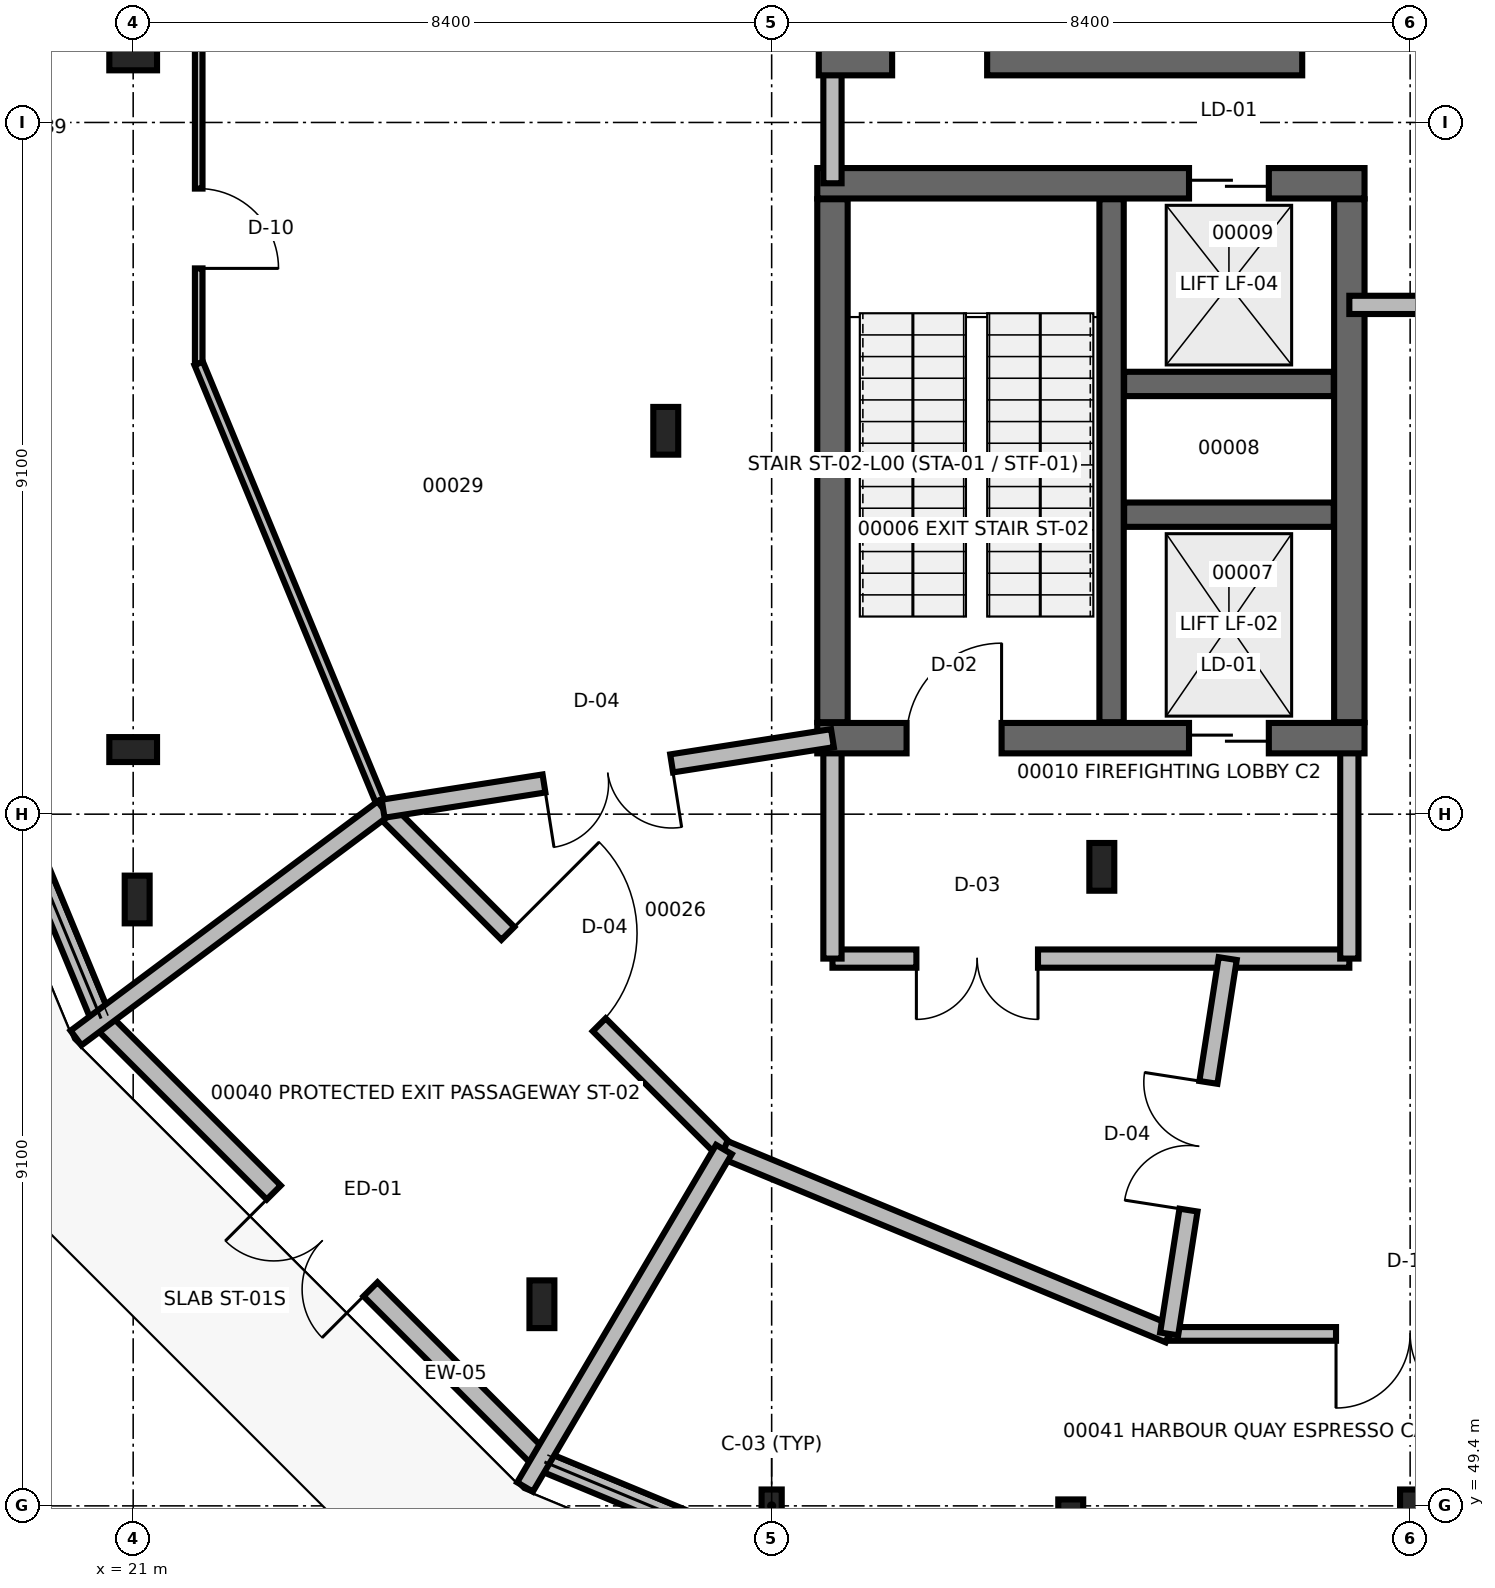
"""IFC4 building model, lengths in metres.
Left out: names, types, materials, properties, quantities, classifications, styles, units other than length and angle.
Written with IfcOpenShell. Run it as: python <this file> out.ifc"""

import sys

from ifc_helpers import new_model, si_unit, direction, frame, frame_2d, origin, origin_2d, place, context, subcontext, project, spatial, rectangle, i_section, extrude, element, fill, save


model = new_model("IFC4")
c1 = context("Model", 3, precision=1e-05, world=origin(), true_north=direction((0.0, 1.0)))
c2 = subcontext(c1, "Body", "Model", "MODEL_VIEW")
j1 = project(units=[si_unit("LENGTHUNIT", "METRE"), si_unit("PLANEANGLEUNIT", "RADIAN")], contexts=[c1])
p1 = place(None, origin())
s1 = spatial("IfcSite", under=j1, at=p1, CompositionType="ELEMENT")
p2 = place(p1, origin())
s2 = spatial("IfcBuilding", under=s1, at=p2, CompositionType="ELEMENT")
p3 = place(p2, origin())
s3 = spatial("IfcBuildingStorey", under=s2, at=p3, CompositionType="ELEMENT", Elevation=0.0)
for number, where, z_axis, x_axis in (
    (1, (28.007, 63.544, 0.0), (0.0, 0.0, 1.0), (1.0, 0.0, 0.0)),
    (2, (33.744, 57.807, 0.0), (0.0, 0.0, 1.0), (1.0, 0.0, 0.0)),
    (3, (21.052, 57.377, 0.0), (0.0, 0.0, 1.0), (1.0, 0.0, 0.0)),
    (4, (26.377, 52.052, 0.0), (0.0, 0.0, 1.0), (1.0, 0.0, 0.0)),
    (5, (33.335, 49.171, 0.0), (0.0, 0.0, 1.0), (1.0, 0.0, 0.0)),
    (6, (21.0, 59.35, 0.0), (0.0, 0.0, 1.0), (0.0, 1.0, 0.0)),
    (7, (21.0, 68.45, 0.0), (0.0, 0.0, 1.0), (0.0, 1.0, 0.0)),
):
    element("IfcColumn", number, at=place(p3, frame(where, z_axis=z_axis, x_axis=x_axis)), inside=s3, PredefinedType="COLUMN", context=c2, shape_type="SweptSolid", body=[
        extrude(i_section(OverallWidth=0.328, OverallDepth=0.628, WebThickness=0.017, FlangeThickness=0.028, at=origin_2d()), origin(), (0.0, 0.0, 1.0), 5.1),
    ])
for number, where, z_axis, x_axis in (
    (8, (29.4, 49.4, 0.0), (0.0, 0.0, 1.0), (1.0, 0.0, 0.0)),
    (9, (37.8, 49.4, 0.0), (0.0, 0.0, 1.0), (1.0, 0.0, 0.0)),
):
    element("IfcColumn", number, at=place(p3, frame(where, z_axis=z_axis, x_axis=x_axis)), inside=s3, PredefinedType="COLUMN", context=c2, shape_type="SweptSolid", body=[
        extrude(i_section(OverallWidth=0.265, OverallDepth=0.431, WebThickness=0.015, FlangeThickness=0.025, at=origin_2d()), origin(), (0.0, 0.0, 1.0), 5.1),
    ])
p4 = place(p3, frame((17.465, 63.325, 0.0), z_axis=(0.0, 0.0, 1.0), x_axis=(0.382670790122, -0.923884768998, 0.0)))
e10 = element("IfcWall", 10, at=p4, inside=s3, PredefinedType="SOLIDWALL", context=c2, shape_type="SweptSolid", body=[
    extrude(rectangle(XDim=8.134, YDim=0.26, at=frame_2d((4.067, 0.0))), origin(), (0.0, 0.0, 1.0), 1.48),
])
p5 = place(p3, frame((20.61, 55.762, 0.0), z_axis=(0.0, 0.0, 1.0), x_axis=(0.707106781187, -0.707106781187, 0.0)))
e11 = element("IfcWall", 11, at=p5, inside=s3, PredefinedType="SOLIDWALL", context=c2, shape_type="SweptSolid", body=[
    extrude(rectangle(XDim=8.134, YDim=0.26, at=frame_2d((4.067, 0.0))), origin(), (0.0, 0.0, 1.0), 3.845),
])
p6 = place(p5, frame((3.167, 0.0, 0.0)))
e12 = element("IfcOpeningElement", 12, at=p6, cuts=e11, PredefinedType="OPENING", context=c2, shape_type="SweptSolid", body=[
    extrude(rectangle(XDim=1.8, YDim=2.4, at=frame_2d((0.9, 1.2))), frame((0.0, 0.14, 0.0), z_axis=(0.0, -1.0, 0.0), x_axis=(1.0, 0.0, 0.0)), (0.0, 0.0, 1.0), 0.28),
])
p7 = place(p3, frame((26.411, 49.978, 0.0), z_axis=(0.0, 0.0, 1.0), x_axis=(0.923884768998, -0.382670790122, 0.0)))
e13 = element("IfcWall", 13, at=p7, inside=s3, PredefinedType="SOLIDWALL", context=c2, shape_type="SweptSolid", body=[
    extrude(rectangle(XDim=8.134, YDim=0.26, at=frame_2d((4.067, 0.0))), origin(), (0.0, 0.0, 1.0), 1.48),
])
p8 = place(p3, frame((30.2, 56.6, 0.0), z_axis=(0.0, 0.0, 1.0), x_axis=(1.0, 0.0, 0.0)))
e14 = element("IfcWall", 14, at=p8, inside=s3, PredefinedType="SOLIDWALL", context=c2, shape_type="SweptSolid", body=[
    extrude(rectangle(XDim=6.8, YDim=0.24, at=frame_2d((3.4, 0.0))), origin(), (0.0, 0.0, 1.0), 4.179),
])
p9 = place(p8, frame((1.104, 0.0, 0.0)))
e15 = element("IfcOpeningElement", 15, at=p9, cuts=e14, PredefinedType="OPENING", context=c2, shape_type="SweptSolid", body=[
    extrude(rectangle(XDim=1.6, YDim=2.2, at=frame_2d((0.8, 1.1))), frame((0.0, 0.13, 0.0), z_axis=(0.0, -1.0, 0.0), x_axis=(1.0, 0.0, 0.0)), (0.0, 0.0, 1.0), 0.26),
])
p10 = place(p3, frame((30.2, 59.5, 0.0), z_axis=(0.0, 0.0, 1.0), x_axis=(0.0, -1.0, 0.0)))
e16 = element("IfcWall", 16, at=p10, inside=s3, PredefinedType="SOLIDWALL", context=c2, shape_type="SweptSolid", body=[
    extrude(rectangle(XDim=2.9, YDim=0.24, at=frame_2d((1.45, 0.0))), origin(), (0.0, 0.0, 1.0), 4.72),
])
p11 = place(p3, frame((37.0, 56.6, 0.0), z_axis=(0.0, 0.0, 1.0), x_axis=(0.0, 1.0, 0.0)))
e17 = element("IfcWall", 17, at=p11, inside=s3, PredefinedType="SOLIDWALL", context=c2, shape_type="SweptSolid", body=[
    extrude(rectangle(XDim=2.9, YDim=0.24, at=frame_2d((1.45, 0.0))), origin(), (0.0, 0.0, 1.0), 4.179),
])
p12 = place(p3, frame((30.0, 59.5, 0.0), z_axis=(0.0, 0.0, 1.0), x_axis=(1.0, 0.0, 0.0)))
e18 = element("IfcWall", 18, at=p12, inside=s3, PredefinedType="SHEAR", context=c2, shape_type="SweptSolid", body=[
    extrude(rectangle(XDim=7.2, YDim=0.4, at=frame_2d((3.6, 0.0))), origin(), (0.0, 0.0, 1.0), 4.82),
])
p13 = place(p12, frame((1.175, 0.0, 0.0)))
e19 = element("IfcOpeningElement", 19, at=p13, cuts=e18, PredefinedType="OPENING", context=c2, shape_type="SweptSolid", body=[
    extrude(rectangle(XDim=1.25, YDim=2.2, at=frame_2d((0.625, 1.1))), frame((0.0, 0.21, 0.0), z_axis=(0.0, -1.0, 0.0), x_axis=(1.0, 0.0, 0.0)), (0.0, 0.0, 1.0), 0.42),
])
p14 = place(p12, frame((4.891, 0.0, 0.0)))
e20 = element("IfcOpeningElement", 20, at=p14, cuts=e18, PredefinedType="OPENING", context=c2, shape_type="SweptSolid", body=[
    extrude(rectangle(XDim=1.05, YDim=2.15, at=frame_2d((0.525, 1.075))), frame((0.0, 0.21, 0.0), z_axis=(0.0, -1.0, 0.0), x_axis=(1.0, 0.0, 0.0)), (0.0, 0.0, 1.0), 0.42),
])
p15 = place(p3, frame((30.0, 66.8, 0.0), z_axis=(0.0, 0.0, 1.0), x_axis=(1.0, 0.0, 0.0)))
e21 = element("IfcWall", 21, at=p15, inside=s3, PredefinedType="SHEAR", context=c2, shape_type="SweptSolid", body=[
    extrude(rectangle(XDim=7.2, YDim=0.4, at=frame_2d((3.6, 0.0))), origin(), (0.0, 0.0, 1.0), 4.82),
])
p16 = place(p15, frame((4.891, 0.0, 0.0)))
e22 = element("IfcOpeningElement", 22, at=p16, cuts=e21, PredefinedType="OPENING", context=c2, shape_type="SweptSolid", body=[
    extrude(rectangle(XDim=1.05, YDim=2.15, at=frame_2d((0.525, 1.075))), frame((0.0, 0.21, 0.0), z_axis=(0.0, -1.0, 0.0), x_axis=(1.0, 0.0, 0.0)), (0.0, 0.0, 1.0), 0.42),
])
for number, where, z_axis, x_axis in (
    (23, (30.2, 59.71, 0.0), (0.0, 0.0, 1.0), (0.0, 1.0, 0.0)),
    (24, (37.0, 59.71, 0.0), (0.0, 0.0, 1.0), (0.0, 1.0, 0.0)),
):
    element("IfcWall", number, at=place(p3, frame(where, z_axis=z_axis, x_axis=x_axis)), inside=s3, PredefinedType="SHEAR", context=c2, shape_type="SweptSolid", body=[
        extrude(rectangle(XDim=6.88, YDim=0.4, at=frame_2d((3.44, 0.0))), origin(), (0.0, 0.0, 1.0), 4.82),
    ])
p17 = place(p3, frame((33.872, 59.71, 0.0), z_axis=(0.0, 0.0, 1.0), x_axis=(0.0, 1.0, 0.0)))
e25 = element("IfcWall", 25, at=p17, inside=s3, PredefinedType="SHEAR", context=c2, shape_type="SweptSolid", body=[
    extrude(rectangle(XDim=6.88, YDim=0.32, at=frame_2d((3.44, 0.0))), origin(), (0.0, 0.0, 1.0), 4.82),
])
for number, where, z_axis, x_axis in (
    (26, (34.037, 62.44, 0.0), (0.0, 0.0, 1.0), (1.0, 0.0, 0.0)),
    (27, (34.037, 64.16, 0.0), (0.0, 0.0, 1.0), (1.0, 0.0, 0.0)),
):
    element("IfcWall", number, at=place(p3, frame(where, z_axis=z_axis, x_axis=x_axis)), inside=s3, PredefinedType="SHEAR", context=c2, shape_type="SweptSolid", body=[
        extrude(rectangle(XDim=2.758, YDim=0.32, at=frame_2d((1.379, 0.0))), origin(), (0.0, 0.0, 1.0), 4.82),
    ])
p18 = place(p3, frame((30.2, 66.8, 0.0), z_axis=(0.0, 0.0, 1.0), x_axis=(0.0, 1.0, 0.0)))
e28 = element("IfcWall", 28, at=p18, inside=s3, PredefinedType="SOLIDWALL", context=c2, shape_type="SweptSolid", body=[
    extrude(rectangle(XDim=1.6, YDim=0.24, at=frame_2d((0.8, 0.0))), origin(), (0.0, 0.0, 1.0), 4.72),
])
p19 = place(p3, frame((37.0, 65.2, 0.0), z_axis=(0.0, 0.0, 1.0), x_axis=(1.0, 0.0, 0.0)))
e29 = element("IfcWall", 29, at=p19, inside=s3, PredefinedType="SOLIDWALL", context=c2, shape_type="SweptSolid", body=[
    extrude(rectangle(XDim=1.6, YDim=0.24, at=frame_2d((0.8, 0.0))), origin(), (0.0, 0.0, 1.0), 4.72),
])
p20 = place(p3, frame((30.02, 68.4, 0.0), z_axis=(0.0, 0.0, 1.0), x_axis=(1.0, 0.0, 0.0)))
e30 = element("IfcWall", 30, at=p20, inside=s3, PredefinedType="SHEAR", context=c2, shape_type="SweptSolid", body=[
    extrude(rectangle(XDim=6.36, YDim=0.36, at=frame_2d((3.18, 0.0))), origin(), (0.0, 0.0, 1.0), 4.82),
])
p21 = place(p20, frame((0.965, 0.0, 0.0)))
e31 = element("IfcOpeningElement", 31, at=p21, cuts=e30, PredefinedType="OPENING", context=c2, shape_type="SweptSolid", body=[
    extrude(rectangle(XDim=1.25, YDim=2.2, at=frame_2d((0.625, 1.1))), frame((0.0, 0.19, 0.0), z_axis=(0.0, -1.0, 0.0), x_axis=(1.0, 0.0, 0.0)), (0.0, 0.0, 1.0), 0.38),
])
p22 = place(p3, frame((21.862, 70.77, 0.0), z_axis=(0.0, 0.0, 1.0), x_axis=(0.0, -1.0, 0.0)))
e32 = element("IfcWall", 32, at=p22, inside=s3, PredefinedType="PARTITIONING", context=c2, shape_type="SweptSolid", body=[
    extrude(rectangle(XDim=6.341, YDim=0.1, at=frame_2d((3.17, 0.0))), origin(), (0.0, 0.0, 1.0), 4.179),
])
p23 = place(p22, frame((4.04, 0.0, 0.0)))
e33 = element("IfcOpeningElement", 33, at=p23, cuts=e32, PredefinedType="OPENING", context=c2, shape_type="SweptSolid", body=[
    extrude(rectangle(XDim=1.05, YDim=2.15, at=frame_2d((0.525, 1.075))), frame((0.0, 0.06, 0.0), z_axis=(0.0, -1.0, 0.0), x_axis=(1.0, 0.0, 0.0)), (0.0, 0.0, 1.0), 0.12),
])
p24 = place(p3, frame((21.862, 64.43, 0.0), z_axis=(0.0, 0.0, 1.0), x_axis=(0.382676004295, -0.923882609284, 0.0)))
e34 = element("IfcWall", 34, at=p24, inside=s3, PredefinedType="PARTITIONING", context=c2, shape_type="SweptSolid", body=[
    extrude(rectangle(XDim=6.34, YDim=0.12, at=frame_2d((3.17, 0.0))), origin(), (0.0, 0.0, 1.0), 4.179),
])
p25 = place(p3, frame((24.289, 58.572, 0.0), z_axis=(0.0, 0.0, 1.0), x_axis=(0.707106781187, -0.707106781187, 0.0)))
e35 = element("IfcWall", 35, at=p25, inside=s3, PredefinedType="SOLIDWALL", context=c2, shape_type="SweptSolid", body=[
    extrude(rectangle(XDim=6.341, YDim=0.24, at=frame_2d((3.17, 0.0))), origin(), (0.0, 0.0, 1.0), 4.179),
])
p26 = place(p25, frame((2.32, 0.0, 0.0)))
e36 = element("IfcOpeningElement", 36, at=p26, cuts=e35, PredefinedType="OPENING", context=c2, shape_type="SweptSolid", body=[
    extrude(rectangle(XDim=1.7, YDim=2.25, at=frame_2d((0.85, 1.125))), frame((0.0, 0.13, 0.0), z_axis=(0.0, -1.0, 0.0), x_axis=(1.0, 0.0, 0.0)), (0.0, 0.0, 1.0), 0.26),
])
p27 = place(p3, frame((28.772, 54.089, 0.0), z_axis=(0.0, 0.0, 1.0), x_axis=(0.92387463456, -0.382695256851, 0.0)))
e37 = element("IfcWall", 37, at=p27, inside=s3, PredefinedType="SOLIDWALL", context=c2, shape_type="SweptSolid", body=[
    extrude(rectangle(XDim=6.341, YDim=0.24, at=frame_2d((3.17, 0.0))), origin(), (0.0, 0.0, 1.0), 4.179),
])
p28 = place(p3, frame((34.63, 51.662, 0.0), z_axis=(0.0, 0.0, 1.0), x_axis=(1.0, 0.0, 0.0)))
e38 = element("IfcWall", 38, at=p28, inside=s3, PredefinedType="PARTITIONING", context=c2, shape_type="SweptSolid", body=[
    extrude(rectangle(XDim=6.34, YDim=0.18, at=frame_2d((3.17, 0.0))), origin(), (0.0, 0.0, 1.0), 4.179),
])
p29 = place(p28, frame((2.195, 0.0, 0.0)))
e39 = element("IfcOpeningElement", 39, at=p29, cuts=e38, PredefinedType="OPENING", context=c2, shape_type="SweptSolid", body=[
    extrude(rectangle(XDim=1.95, YDim=2.35, at=frame_2d((0.975, 1.175))), frame((0.0, 0.1, 0.0), z_axis=(0.0, -1.0, 0.0), x_axis=(1.0, 0.0, 0.0)), (0.0, 0.0, 1.0), 0.2),
])
p30 = place(p3, frame((24.289, 58.572, 0.0), z_axis=(0.0, 0.0, 1.0), x_axis=(-0.801270627891, -0.598302081627, 0.0)))
e40 = element("IfcWall", 40, at=p30, inside=s3, PredefinedType="SOLIDWALL", context=c2, shape_type="SweptSolid", body=[
    extrude(rectangle(XDim=5.042, YDim=0.24, at=frame_2d((2.521, 0.0))), origin(), (0.0, 0.0, 1.0), 4.179),
])
p31 = place(p3, frame((28.772, 54.089, 0.0), z_axis=(0.0, 0.0, 1.0), x_axis=(-0.507694819058, -0.861536981622, 0.0)))
e41 = element("IfcWall", 41, at=p31, inside=s3, PredefinedType="SOLIDWALL", context=c2, shape_type="SweptSolid", body=[
    extrude(rectangle(XDim=5.154, YDim=0.24, at=frame_2d((2.577, 0.0))), origin(), (0.0, 0.0, 1.0), 4.179),
])
p32 = place(p3, frame((24.289, 58.572, 0.0), z_axis=(0.0, 0.0, 1.0), x_axis=(0.987901515466, 0.155082544926, 0.0)))
e42 = element("IfcWall", 42, at=p32, inside=s3, PredefinedType="SOLIDWALL", context=c2, shape_type="SweptSolid", body=[
    extrude(rectangle(XDim=5.984, YDim=0.24, at=frame_2d((2.992, 0.0))), origin(), (0.0, 0.0, 1.0), 4.179),
])
p33 = place(p32, frame((2.142, 0.0, 0.0)))
e43 = element("IfcOpeningElement", 43, at=p33, cuts=e42, PredefinedType="OPENING", context=c2, shape_type="SweptSolid", body=[
    extrude(rectangle(XDim=1.7, YDim=2.25, at=frame_2d((0.85, 1.125))), frame((0.0, 0.13, 0.0), z_axis=(0.0, -1.0, 0.0), x_axis=(1.0, 0.0, 0.0)), (0.0, 0.0, 1.0), 0.26),
])
p34 = place(p3, frame((34.63, 51.662, 0.0), z_axis=(0.0, 0.0, 1.0), x_axis=(0.154075850756, 0.988059022637, 0.0)))
e44 = element("IfcWall", 44, at=p34, inside=s3, PredefinedType="SOLIDWALL", context=c2, shape_type="SweptSolid", body=[
    extrude(rectangle(XDim=4.998, YDim=0.24, at=frame_2d((2.499, 0.0))), origin(), (0.0, 0.0, 1.0), 4.179),
])
p35 = place(p34, frame((1.649, 0.0, 0.0)))
e45 = element("IfcOpeningElement", 45, at=p35, cuts=e44, PredefinedType="OPENING", context=c2, shape_type="SweptSolid", body=[
    extrude(rectangle(XDim=1.7, YDim=2.25, at=frame_2d((0.85, 1.125))), frame((0.0, 0.13, 0.0), z_axis=(0.0, -1.0, 0.0), x_axis=(1.0, 0.0, 0.0)), (0.0, 0.0, 1.0), 0.26),
])
p36 = place(p6, frame((1.8, 0.0, 0.0), z_axis=(0.0, 0.0, 1.0), x_axis=(-1.0, 0.0, 0.0)))
e46 = element("IfcDoor", 46, at=p36, inside=s3, OperationType="DOUBLE_DOOR_SINGLE_SWING", PredefinedType="DOOR", context=c2, shape_type="SweptSolid", body=[
    extrude(rectangle(XDim=1.8, YDim=2.4, at=frame_2d((0.9, 1.2))), frame((0.0, 0.025, 0.0), z_axis=(0.0, -1.0, 0.0), x_axis=(1.0, 0.0, 0.0)), (0.0, 0.0, 1.0), 0.05),
])
fill(e12, e46)
p37 = place(p9, frame((1.6, 0.0, 0.0), z_axis=(0.0, 0.0, 1.0), x_axis=(-1.0, 0.0, 0.0)))
e47 = element("IfcDoor", 47, at=p37, inside=s3, OperationType="DOUBLE_DOOR_SINGLE_SWING", PredefinedType="DOOR", context=c2, shape_type="SweptSolid", body=[
    extrude(rectangle(XDim=1.6, YDim=2.2, at=frame_2d((0.8, 1.1))), frame((0.0, 0.025, 0.0), z_axis=(0.0, -1.0, 0.0), x_axis=(1.0, 0.0, 0.0)), (0.0, 0.0, 1.0), 0.05),
])
fill(e15, e47)
p38 = place(p13, frame((1.25, 0.0, 0.0), z_axis=(0.0, 0.0, 1.0), x_axis=(-1.0, 0.0, 0.0)))
e48 = element("IfcDoor", 48, at=p38, inside=s3, OperationType="SINGLE_SWING_LEFT", PredefinedType="DOOR", context=c2, shape_type="SweptSolid", body=[
    extrude(rectangle(XDim=1.25, YDim=2.2, at=frame_2d((0.625, 1.1))), frame((0.0, 0.025, 0.0), z_axis=(0.0, -1.0, 0.0), x_axis=(1.0, 0.0, 0.0)), (0.0, 0.0, 1.0), 0.05),
])
fill(e19, e48)
p39 = place(p14, frame((1.05, 0.0, 0.0), z_axis=(0.0, 0.0, 1.0), x_axis=(-1.0, 0.0, 0.0)))
e49 = element("IfcDoor", 49, at=p39, inside=s3, OperationType="DOUBLE_DOOR_SLIDING", PredefinedType="DOOR", context=c2, shape_type="SweptSolid", body=[
    extrude(rectangle(XDim=1.05, YDim=2.15, at=frame_2d((0.525, 1.075))), frame((0.0, 0.025, 0.0), z_axis=(0.0, -1.0, 0.0), x_axis=(1.0, 0.0, 0.0)), (0.0, 0.0, 1.0), 0.05),
])
fill(e20, e49)
p40 = place(p16, origin())
e50 = element("IfcDoor", 50, at=p40, inside=s3, OperationType="DOUBLE_DOOR_SLIDING", PredefinedType="DOOR", context=c2, shape_type="SweptSolid", body=[
    extrude(rectangle(XDim=1.05, YDim=2.15, at=frame_2d((0.525, 1.075))), frame((0.0, 0.025, 0.0), z_axis=(0.0, -1.0, 0.0), x_axis=(1.0, 0.0, 0.0)), (0.0, 0.0, 1.0), 0.05),
])
fill(e22, e50)
p41 = place(p21, frame((1.25, 0.0, 0.0), z_axis=(0.0, 0.0, 1.0), x_axis=(-1.0, 0.0, 0.0)))
e51 = element("IfcDoor", 51, at=p41, inside=s3, OperationType="SINGLE_SWING_RIGHT", PredefinedType="DOOR", context=c2, shape_type="SweptSolid", body=[
    extrude(rectangle(XDim=1.25, YDim=2.2, at=frame_2d((0.625, 1.1))), frame((0.0, 0.025, 0.0), z_axis=(0.0, -1.0, 0.0), x_axis=(1.0, 0.0, 0.0)), (0.0, 0.0, 1.0), 0.05),
])
fill(e31, e51)
p42 = place(p23, frame((1.05, 0.0, 0.0), z_axis=(0.0, 0.0, 1.0), x_axis=(-1.0, 0.0, 0.0)))
e52 = element("IfcDoor", 52, at=p42, inside=s3, OperationType="SINGLE_SWING_LEFT", PredefinedType="DOOR", context=c2, shape_type="SweptSolid", body=[
    extrude(rectangle(XDim=1.05, YDim=2.15, at=frame_2d((0.525, 1.075))), frame((0.0, 0.025, 0.0), z_axis=(0.0, -1.0, 0.0), x_axis=(1.0, 0.0, 0.0)), (0.0, 0.0, 1.0), 0.05),
])
fill(e33, e52)
p43 = place(p26, frame((1.7, 0.0, 0.0), z_axis=(0.0, 0.0, 1.0), x_axis=(-1.0, 0.0, 0.0)))
e53 = element("IfcDoor", 53, at=p43, inside=s3, OperationType="SINGLE_SWING_RIGHT", PredefinedType="DOOR", context=c2, shape_type="SweptSolid", body=[
    extrude(rectangle(XDim=1.7, YDim=2.25, at=frame_2d((0.85, 1.125))), frame((0.0, 0.025, 0.0), z_axis=(0.0, -1.0, 0.0), x_axis=(1.0, 0.0, 0.0)), (0.0, 0.0, 1.0), 0.05),
])
fill(e36, e53)
p44 = place(p29, frame((1.95, 0.0, 0.0), z_axis=(0.0, 0.0, 1.0), x_axis=(-1.0, 0.0, 0.0)))
e54 = element("IfcDoor", 54, at=p44, inside=s3, OperationType="DOUBLE_DOOR_SINGLE_SWING", PredefinedType="DOOR", context=c2, shape_type="SweptSolid", body=[
    extrude(rectangle(XDim=1.95, YDim=2.35, at=frame_2d((0.975, 1.175))), frame((0.0, 0.025, 0.0), z_axis=(0.0, -1.0, 0.0), x_axis=(1.0, 0.0, 0.0)), (0.0, 0.0, 1.0), 0.05),
])
fill(e39, e54)
p45 = place(p33, frame((1.7, 0.0, 0.0), z_axis=(0.0, 0.0, 1.0), x_axis=(-1.0, 0.0, 0.0)))
e55 = element("IfcDoor", 55, at=p45, inside=s3, OperationType="DOUBLE_DOOR_SINGLE_SWING", PredefinedType="DOOR", context=c2, shape_type="SweptSolid", body=[
    extrude(rectangle(XDim=1.7, YDim=2.25, at=frame_2d((0.85, 1.125))), frame((0.0, 0.025, 0.0), z_axis=(0.0, -1.0, 0.0), x_axis=(1.0, 0.0, 0.0)), (0.0, 0.0, 1.0), 0.05),
])
fill(e43, e55)
p46 = place(p35, origin())
e56 = element("IfcDoor", 56, at=p46, inside=s3, OperationType="DOUBLE_DOOR_SINGLE_SWING", PredefinedType="DOOR", context=c2, shape_type="SweptSolid", body=[
    extrude(rectangle(XDim=1.7, YDim=2.25, at=frame_2d((0.85, 1.125))), frame((0.0, 0.025, 0.0), z_axis=(0.0, -1.0, 0.0), x_axis=(1.0, 0.0, 0.0)), (0.0, 0.0, 1.0), 0.05),
])
fill(e45, e56)
save(model, sys.argv[1])
